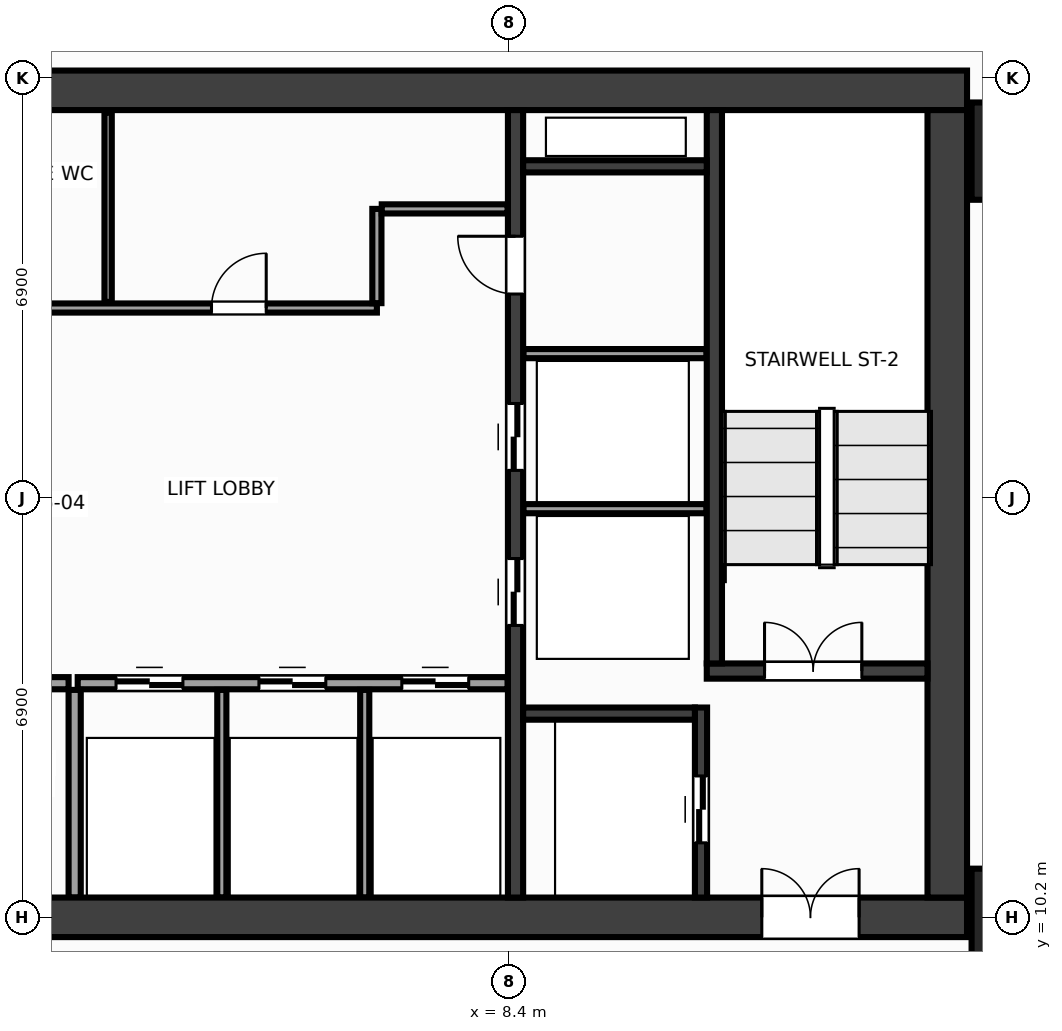
"""IFC4 building model, lengths in metres.
Left out: names, types, materials, properties, quantities, classifications, styles, units other than length and angle.
Written with IfcOpenShell. Run it as: python <this file> out.ifc"""

import sys

from ifc_helpers import new_model, si_unit, direction, frame, frame_2d, origin, origin_2d, place, context, subcontext, project, spatial, rectangle, extrude, source, transform, mapped, element, fill, save


model = new_model("IFC4")
c1 = context("Model", 3, precision=1e-05, world=origin(), true_north=direction((0.0, 1.0)))
c2 = subcontext(c1, "Body", "Model", "MODEL_VIEW")
j1 = project(units=[si_unit("LENGTHUNIT", "METRE"), si_unit("PLANEANGLEUNIT", "RADIAN")], contexts=[c1])
p1 = place(None, origin())
s1 = spatial("IfcSite", under=j1, at=p1, CompositionType="ELEMENT")
p2 = place(p1, origin())
s2 = spatial("IfcBuilding", under=s1, at=p2, CompositionType="ELEMENT")
p3 = place(p2, frame((0.0, 0.0, 77.6)))
s3 = spatial("IfcBuildingStorey", under=s2, at=p3, CompositionType="ELEMENT", Elevation=77.6)
m1 = source(origin(), c2, "Body", "SweptSolid", [
    extrude(rectangle(XDim=31.85, YDim=0.65, at=frame_2d((15.925, 0.0))), origin(), (0.0, 0.0, 1.0), 3.6),
])
p4 = place(p3, frame((-15.925, 23.8, 0.0), z_axis=(0.0, 0.0, 1.0), x_axis=(1.0, 0.0, 0.0)))
e1 = element("IfcWall", 1, at=p4, inside=s3, PredefinedType="SHEAR", context=c2, shape_type="MappedRepresentation", body=[
    mapped(m1, transform((0.0, 0.0, 0.0), x_axis=(1.0, 0.0, 0.0), y_axis=(0.0, 1.0, 0.0), z_axis=(0.0, 0.0, 1.0), scale=1.0)),
])
p5 = place(p3, frame((-15.925, 10.2, 0.0), z_axis=(0.0, 0.0, 1.0), x_axis=(1.0, 0.0, 0.0)))
e2 = element("IfcWall", 2, at=p5, inside=s3, PredefinedType="SHEAR", context=c2, shape_type="MappedRepresentation", body=[
    mapped(m1, transform((0.0, 0.0, 0.0), x_axis=(1.0, 0.0, 0.0), y_axis=(0.0, 1.0, 0.0), z_axis=(0.0, 0.0, 1.0), scale=1.0)),
])
p6 = place(p5, frame((1.775, 0.0, 0.0)))
e3 = element("IfcOpeningElement", 3, at=p6, cuts=e2, PredefinedType="OPENING", context=c2, shape_type="SweptSolid", body=[
    extrude(rectangle(XDim=1.6, YDim=2.15, at=frame_2d((0.8, 1.075))), frame((0.0, 0.337, 0.0), z_axis=(0.0, -1.0, 0.0), x_axis=(1.0, 0.0, 0.0)), (0.0, 0.0, 1.0), 0.674),
])
p7 = place(p5, frame((28.475, 0.0, 0.0)))
e4 = element("IfcOpeningElement", 4, at=p7, cuts=e2, PredefinedType="OPENING", context=c2, shape_type="SweptSolid", body=[
    extrude(rectangle(XDim=1.6, YDim=2.15, at=frame_2d((0.8, 1.075))), frame((0.0, 0.337, 0.0), z_axis=(0.0, -1.0, 0.0), x_axis=(1.0, 0.0, 0.0)), (0.0, 0.0, 1.0), 0.674),
])
p8 = place(p5, frame((15.175, 0.0, 0.0)))
e5 = element("IfcOpeningElement", 5, at=p8, cuts=e2, PredefinedType="OPENING", context=c2, shape_type="SweptSolid", body=[
    extrude(rectangle(XDim=1.5, YDim=2.2, at=frame_2d((0.75, 1.1))), frame((0.0, 0.337, 0.0), z_axis=(0.0, -1.0, 0.0), x_axis=(1.0, 0.0, 0.0)), (0.0, 0.0, 1.0), 0.674),
])
m2 = source(origin(), c2, "Body", "SweptSolid", [
    extrude(rectangle(XDim=12.95, YDim=0.65, at=frame_2d((6.475, 0.0))), origin(), (0.0, 0.0, 1.0), 3.6),
])
p9 = place(p3, frame((15.6, 10.525, 0.0), z_axis=(0.0, 0.0, 1.0), x_axis=(0.0, 1.0, 0.0)))
e6 = element("IfcWall", 6, at=p9, inside=s3, PredefinedType="SHEAR", context=c2, shape_type="MappedRepresentation", body=[
    mapped(m2, transform((0.0, 0.0, 0.0), x_axis=(1.0, 0.0, 0.0), y_axis=(0.0, 1.0, 0.0), z_axis=(0.0, 0.0, 1.0), scale=1.0)),
])
m3 = source(origin(), c2, "Body", "SweptSolid", [
    extrude(rectangle(XDim=12.95, YDim=0.25, at=frame_2d((6.475, 0.0))), origin(), (0.0, 0.0, 1.0), 3.6),
])
p10 = place(p3, frame((8.5, 10.525, 0.0), z_axis=(0.0, 0.0, 1.0), x_axis=(0.0, 1.0, 0.0)))
e7 = element("IfcWall", 7, at=p10, inside=s3, PredefinedType="SHEAR", context=c2, shape_type="MappedRepresentation", body=[
    mapped(m3, transform((0.0, 0.0, 0.0), x_axis=(1.0, 0.0, 0.0), y_axis=(0.0, 1.0, 0.0), z_axis=(0.0, 0.0, 1.0), scale=1.0)),
])
p11 = place(p10, frame((4.475, 0.0, 0.0)))
e8 = element("IfcOpeningElement", 8, at=p11, cuts=e7, PredefinedType="OPENING", context=c2, shape_type="SweptSolid", body=[
    extrude(rectangle(XDim=1.1, YDim=2.15, at=frame_2d((0.55, 1.075))), frame((0.0, 0.137, 0.0), z_axis=(0.0, -1.0, 0.0), x_axis=(1.0, 0.0, 0.0)), (0.0, 0.0, 1.0), 0.274),
])
p12 = place(p10, frame((7.025, 0.0, 0.0)))
e9 = element("IfcOpeningElement", 9, at=p12, cuts=e7, PredefinedType="OPENING", context=c2, shape_type="SweptSolid", body=[
    extrude(rectangle(XDim=1.1, YDim=2.15, at=frame_2d((0.55, 1.075))), frame((0.0, 0.137, 0.0), z_axis=(0.0, -1.0, 0.0), x_axis=(1.0, 0.0, 0.0)), (0.0, 0.0, 1.0), 0.274),
])
p13 = place(p10, frame((9.925, 0.0, 0.0)))
e10 = element("IfcOpeningElement", 10, at=p13, cuts=e7, PredefinedType="OPENING", context=c2, shape_type="SweptSolid", body=[
    extrude(rectangle(XDim=0.95, YDim=2.15, at=frame_2d((0.475, 1.075))), frame((0.0, 0.137, 0.0), z_axis=(0.0, -1.0, 0.0), x_axis=(1.0, 0.0, 0.0)), (0.0, 0.0, 1.0), 0.274),
])
m4 = source(origin(), c2, "Body", "SweptSolid", [
    extrude(rectangle(XDim=3.63, YDim=0.25, at=frame_2d((1.815, 0.0))), origin(), (0.0, 0.0, 1.0), 3.6),
])
p14 = place(p3, frame((11.645, 14.25, 0.0), z_axis=(0.0, 0.0, 1.0), x_axis=(1.0, 0.0, 0.0)))
e11 = element("IfcWall", 11, at=p14, inside=s3, PredefinedType="SHEAR", context=c2, shape_type="MappedRepresentation", body=[
    mapped(m4, transform((0.0, 0.0, 0.0), x_axis=(1.0, 0.0, 0.0), y_axis=(0.0, 1.0, 0.0), z_axis=(0.0, 0.0, 1.0), scale=1.0)),
])
p15 = place(p14, frame((0.95, 0.0, 0.0)))
e12 = element("IfcOpeningElement", 12, at=p15, cuts=e11, PredefinedType="OPENING", context=c2, shape_type="SweptSolid", body=[
    extrude(rectangle(XDim=1.6, YDim=2.15, at=frame_2d((0.8, 1.075))), frame((0.0, 0.137, 0.0), z_axis=(0.0, -1.0, 0.0), x_axis=(1.0, 0.0, 0.0)), (0.0, 0.0, 1.0), 0.274),
])
m5 = source(origin(), c2, "Body", "SweptSolid", [
    extrude(rectangle(XDim=9.1, YDim=0.25, at=frame_2d((4.55, 0.0))), origin(), (0.0, 0.0, 1.0), 3.6),
])
p16 = place(p3, frame((11.77, 14.375, 0.0), z_axis=(0.0, 0.0, 1.0), x_axis=(0.0, 1.0, 0.0)))
e13 = element("IfcWall", 13, at=p16, inside=s3, PredefinedType="SHEAR", context=c2, shape_type="MappedRepresentation", body=[
    mapped(m5, transform((0.0, 0.0, 0.0), x_axis=(1.0, 0.0, 0.0), y_axis=(0.0, 1.0, 0.0), z_axis=(0.0, 0.0, 1.0), scale=1.0)),
])
m6 = source(origin(), c2, "Body", "SweptSolid", [
    extrude(rectangle(XDim=3.125, YDim=0.2, at=frame_2d((1.562, 0.0))), origin(), (0.0, 0.0, 1.0), 3.6),
])
p17 = place(p3, frame((11.55, 10.525, 0.0), z_axis=(0.0, 0.0, 1.0), x_axis=(0.0, 1.0, 0.0)))
e14 = element("IfcWall", 14, at=p17, inside=s3, PredefinedType="SHEAR", context=c2, shape_type="MappedRepresentation", body=[
    mapped(m6, transform((0.0, 0.0, 0.0), x_axis=(1.0, 0.0, 0.0), y_axis=(0.0, 1.0, 0.0), z_axis=(0.0, 0.0, 1.0), scale=1.0)),
])
p18 = place(p17, frame((0.9, 0.0, 0.0)))
e15 = element("IfcOpeningElement", 15, at=p18, cuts=e14, PredefinedType="OPENING", context=c2, shape_type="SweptSolid", body=[
    extrude(rectangle(XDim=1.1, YDim=2.15, at=frame_2d((0.55, 1.075))), frame((0.0, 0.112, 0.0), z_axis=(0.0, -1.0, 0.0), x_axis=(1.0, 0.0, 0.0)), (0.0, 0.0, 1.0), 0.224),
])
m7 = source(origin(), c2, "Body", "SweptSolid", [
    extrude(rectangle(XDim=2.825, YDim=0.2, at=frame_2d((1.413, 0.0))), origin(), (0.0, 0.0, 1.0), 3.6),
])
p19 = place(p3, frame((8.625, 13.55, 0.0), z_axis=(0.0, 0.0, 1.0), x_axis=(1.0, 0.0, 0.0)))
e16 = element("IfcWall", 16, at=p19, inside=s3, PredefinedType="SHEAR", context=c2, shape_type="MappedRepresentation", body=[
    mapped(m7, transform((0.0, 0.0, 0.0), x_axis=(1.0, 0.0, 0.0), y_axis=(0.0, 1.0, 0.0), z_axis=(0.0, 0.0, 1.0), scale=1.0)),
])
m8 = source(origin(), c2, "Body", "SweptSolid", [
    extrude(rectangle(XDim=3.02, YDim=0.2, at=frame_2d((1.51, 0.0))), origin(), (0.0, 0.0, 1.0), 3.6),
])
p20 = place(p3, frame((8.625, 22.55, 0.0), z_axis=(0.0, 0.0, 1.0), x_axis=(1.0, 0.0, 0.0)))
e17 = element("IfcWall", 17, at=p20, inside=s3, PredefinedType="SHEAR", context=c2, shape_type="MappedRepresentation", body=[
    mapped(m8, transform((0.0, 0.0, 0.0), x_axis=(1.0, 0.0, 0.0), y_axis=(0.0, 1.0, 0.0), z_axis=(0.0, 0.0, 1.0), scale=1.0)),
])
m9 = source(origin(), c2, "Body", "SweptSolid", [
    extrude(rectangle(XDim=1.6, YDim=1.6, at=origin_2d()), origin(), (0.0, 0.0, 1.0), 3.6),
])
for number, where, z_axis, x_axis in (
    (18, (16.8, 10.2, 0.0), (0.0, 0.0, 1.0), (1.0, 0.0, 0.0)),
    (19, (16.8, 22.8, 0.0), (0.0, 0.0, 1.0), (1.0, 0.0, 0.0)),
):
    element("IfcColumn", number, at=place(p3, frame(where, z_axis=z_axis, x_axis=x_axis)), inside=s3, PredefinedType="COLUMN", context=c2, shape_type="MappedRepresentation", body=[
        mapped(m9, transform((0.0, 0.0, 0.0), x_axis=(1.0, 0.0, 0.0), y_axis=(0.0, 1.0, 0.0), z_axis=(0.0, 0.0, 1.0), scale=1.0)),
    ])
m10 = source(origin(), c2, "Body", "SweptSolid", [
    extrude(rectangle(XDim=3.01, YDim=0.15, at=frame_2d((1.505, 0.0))), origin(), (0.0, 0.0, 1.0), 3.36),
])
for number, where, z_axis, x_axis in (
    (20, (8.63, 16.92, 0.0), (0.0, 0.0, 1.0), (1.0, 0.0, 0.0)),
    (21, (8.63, 19.47, 0.0), (0.0, 0.0, 1.0), (1.0, 0.0, 0.0)),
):
    element("IfcWall", number, at=place(p3, frame(where, z_axis=z_axis, x_axis=x_axis)), inside=s3, PredefinedType="PARTITIONING", context=c2, shape_type="MappedRepresentation", body=[
        mapped(m10, transform((0.0, 0.0, 0.0), x_axis=(1.0, 0.0, 0.0), y_axis=(0.0, 1.0, 0.0), z_axis=(0.0, 0.0, 1.0), scale=1.0)),
    ])
m11 = source(origin(), c2, "Body", "SweptSolid", [
    extrude(rectangle(XDim=7.07, YDim=0.2, at=frame_2d((3.535, 0.0))), origin(), (0.0, 0.0, 1.0), 3.36),
])
p21 = place(p3, frame((1.3, 14.05, 0.0), z_axis=(0.0, 0.0, 1.0), x_axis=(1.0, 0.0, 0.0)))
e22 = element("IfcWall", 22, at=p21, inside=s3, PredefinedType="PARTITIONING", context=c2, shape_type="MappedRepresentation", body=[
    mapped(m11, transform((0.0, 0.0, 0.0), x_axis=(1.0, 0.0, 0.0), y_axis=(0.0, 1.0, 0.0), z_axis=(0.0, 0.0, 1.0), scale=1.0)),
])
p22 = place(p21, frame((0.63, 0.0, 0.0)))
e23 = element("IfcOpeningElement", 23, at=p22, cuts=e22, PredefinedType="OPENING", context=c2, shape_type="SweptSolid", body=[
    extrude(rectangle(XDim=1.1, YDim=2.15, at=frame_2d((0.55, 1.075))), frame((0.0, 0.112, 0.0), z_axis=(0.0, -1.0, 0.0), x_axis=(1.0, 0.0, 0.0)), (0.0, 0.0, 1.0), 0.224),
])
p23 = place(p21, frame((2.98, 0.0, 0.0)))
e24 = element("IfcOpeningElement", 24, at=p23, cuts=e22, PredefinedType="OPENING", context=c2, shape_type="SweptSolid", body=[
    extrude(rectangle(XDim=1.1, YDim=2.15, at=frame_2d((0.55, 1.075))), frame((0.0, 0.112, 0.0), z_axis=(0.0, -1.0, 0.0), x_axis=(1.0, 0.0, 0.0)), (0.0, 0.0, 1.0), 0.224),
])
p24 = place(p21, frame((5.33, 0.0, 0.0)))
e25 = element("IfcOpeningElement", 25, at=p24, cuts=e22, PredefinedType="OPENING", context=c2, shape_type="SweptSolid", body=[
    extrude(rectangle(XDim=1.1, YDim=2.15, at=frame_2d((0.55, 1.075))), frame((0.0, 0.112, 0.0), z_axis=(0.0, -1.0, 0.0), x_axis=(1.0, 0.0, 0.0)), (0.0, 0.0, 1.0), 0.224),
])
m12 = source(origin(), c2, "Body", "SweptSolid", [
    extrude(rectangle(XDim=3.415, YDim=0.2, at=frame_2d((1.708, 0.0))), origin(), (0.0, 0.0, 1.0), 3.36),
])
p25 = place(p3, frame((1.25, 10.525, 0.0), z_axis=(0.0, 0.0, 1.0), x_axis=(0.0, 1.0, 0.0)))
e26 = element("IfcWall", 26, at=p25, inside=s3, PredefinedType="PARTITIONING", context=c2, shape_type="MappedRepresentation", body=[
    mapped(m12, transform((0.0, 0.0, 0.0), x_axis=(1.0, 0.0, 0.0), y_axis=(0.0, 1.0, 0.0), z_axis=(0.0, 0.0, 1.0), scale=1.0)),
])
m13 = source(origin(), c2, "Body", "SweptSolid", [
    extrude(rectangle(XDim=2.3, YDim=0.2, at=frame_2d((1.15, 0.0))), origin(), (0.0, 0.0, 1.0), 3.36),
])
p26 = place(p3, frame((-1.15, 14.05, 0.0), z_axis=(0.0, 0.0, 1.0), x_axis=(1.0, 0.0, 0.0)))
e27 = element("IfcWall", 27, at=p26, inside=s3, PredefinedType="PARTITIONING", context=c2, shape_type="MappedRepresentation", body=[
    mapped(m13, transform((0.0, 0.0, 0.0), x_axis=(1.0, 0.0, 0.0), y_axis=(0.0, 1.0, 0.0), z_axis=(0.0, 0.0, 1.0), scale=1.0)),
])
p27 = place(p26, frame((0.4, 0.0, 0.0)))
e28 = element("IfcOpeningElement", 28, at=p27, cuts=e27, PredefinedType="OPENING", context=c2, shape_type="SweptSolid", body=[
    extrude(rectangle(XDim=1.5, YDim=2.2, at=frame_2d((0.75, 1.1))), frame((0.0, 0.112, 0.0), z_axis=(0.0, -1.0, 0.0), x_axis=(1.0, 0.0, 0.0)), (0.0, 0.0, 1.0), 0.224),
])
m14 = source(origin(), c2, "Body", "SweptSolid", [
    extrude(rectangle(XDim=14.59, YDim=0.15, at=frame_2d((7.295, 0.0))), origin(), (0.0, 0.0, 1.0), 3.36),
])
p28 = place(p3, frame((-8.37, 20.22, 0.0), z_axis=(0.0, 0.0, 1.0), x_axis=(1.0, 0.0, 0.0)))
e29 = element("IfcWall", 29, at=p28, inside=s3, PredefinedType="PARTITIONING", context=c2, shape_type="MappedRepresentation", body=[
    mapped(m14, transform((0.0, 0.0, 0.0), x_axis=(1.0, 0.0, 0.0), y_axis=(0.0, 1.0, 0.0), z_axis=(0.0, 0.0, 1.0), scale=1.0)),
])
p29 = place(p28, frame((1.06, 0.0, 0.0)))
e30 = element("IfcOpeningElement", 30, at=p29, cuts=e29, PredefinedType="OPENING", context=c2, shape_type="SweptSolid", body=[
    extrude(rectangle(XDim=0.9, YDim=2.15, at=frame_2d((0.45, 1.075))), frame((0.0, 0.087, 0.0), z_axis=(0.0, -1.0, 0.0), x_axis=(1.0, 0.0, 0.0)), (0.0, 0.0, 1.0), 0.174),
])
p30 = place(p28, frame((4.22, 0.0, 0.0)))
e31 = element("IfcOpeningElement", 31, at=p30, cuts=e29, PredefinedType="OPENING", context=c2, shape_type="SweptSolid", body=[
    extrude(rectangle(XDim=0.9, YDim=2.15, at=frame_2d((0.45, 1.075))), frame((0.0, 0.087, 0.0), z_axis=(0.0, -1.0, 0.0), x_axis=(1.0, 0.0, 0.0)), (0.0, 0.0, 1.0), 0.174),
])
p31 = place(p28, frame((7.82, 0.0, 0.0)))
e32 = element("IfcOpeningElement", 32, at=p31, cuts=e29, PredefinedType="OPENING", context=c2, shape_type="SweptSolid", body=[
    extrude(rectangle(XDim=0.9, YDim=2.15, at=frame_2d((0.45, 1.075))), frame((0.0, 0.087, 0.0), z_axis=(0.0, -1.0, 0.0), x_axis=(1.0, 0.0, 0.0)), (0.0, 0.0, 1.0), 0.174),
])
p32 = place(p28, frame((11.87, 0.0, 0.0)))
e33 = element("IfcOpeningElement", 33, at=p32, cuts=e29, PredefinedType="OPENING", context=c2, shape_type="SweptSolid", body=[
    extrude(rectangle(XDim=0.9, YDim=2.15, at=frame_2d((0.45, 1.075))), frame((0.0, 0.087, 0.0), z_axis=(0.0, -1.0, 0.0), x_axis=(1.0, 0.0, 0.0)), (0.0, 0.0, 1.0), 0.174),
])
m15 = source(origin(), c2, "Body", "SweptSolid", [
    extrude(rectangle(XDim=1.55, YDim=0.15, at=frame_2d((0.775, 0.0))), origin(), (0.0, 0.0, 1.0), 3.36),
])
p33 = place(p3, frame((6.22, 20.3, 0.0), z_axis=(0.0, 0.0, 1.0), x_axis=(0.0, 1.0, 0.0)))
e34 = element("IfcWall", 34, at=p33, inside=s3, PredefinedType="PARTITIONING", context=c2, shape_type="MappedRepresentation", body=[
    mapped(m15, transform((0.0, 0.0, 0.0), x_axis=(1.0, 0.0, 0.0), y_axis=(0.0, 1.0, 0.0), z_axis=(0.0, 0.0, 1.0), scale=1.0)),
])
m16 = source(origin(), c2, "Body", "SweptSolid", [
    extrude(rectangle(XDim=2.07, YDim=0.15, at=frame_2d((1.035, 0.0))), origin(), (0.0, 0.0, 1.0), 3.36),
])
p34 = place(p3, frame((6.3, 21.85, 0.0), z_axis=(0.0, 0.0, 1.0), x_axis=(1.0, 0.0, 0.0)))
e35 = element("IfcWall", 35, at=p34, inside=s3, PredefinedType="PARTITIONING", context=c2, shape_type="MappedRepresentation", body=[
    mapped(m16, transform((0.0, 0.0, 0.0), x_axis=(1.0, 0.0, 0.0), y_axis=(0.0, 1.0, 0.0), z_axis=(0.0, 0.0, 1.0), scale=1.0)),
])
m17 = source(origin(), c2, "Body", "SweptSolid", [
    extrude(rectangle(XDim=3.415, YDim=0.15, at=frame_2d((1.708, 0.0))), origin(), (0.0, 0.0, 1.0), 3.36),
])
for number, where, z_axis, x_axis in (
    (36, (3.67, 10.525, 0.0), (0.0, 0.0, 1.0), (0.0, 1.0, 0.0)),
    (37, (6.02, 10.525, 0.0), (0.0, 0.0, 1.0), (0.0, 1.0, 0.0)),
):
    element("IfcWall", number, at=place(p3, frame(where, z_axis=z_axis, x_axis=x_axis)), inside=s3, PredefinedType="PARTITIONING", context=c2, shape_type="MappedRepresentation", body=[
        mapped(m17, transform((0.0, 0.0, 0.0), x_axis=(1.0, 0.0, 0.0), y_axis=(0.0, 1.0, 0.0), z_axis=(0.0, 0.0, 1.0), scale=1.0)),
    ])
m18 = source(origin(), c2, "Body", "SweptSolid", [
    extrude(rectangle(XDim=3.115, YDim=0.12, at=frame_2d((1.558, 0.0))), origin(), (0.0, 0.0, 1.0), 3.36),
])
p35 = place(p3, frame((1.8, 20.32, 0.0), z_axis=(0.0, 0.0, 1.0), x_axis=(0.0, 1.0, 0.0)))
e38 = element("IfcWall", 38, at=p35, inside=s3, PredefinedType="PARTITIONING", context=c2, shape_type="MappedRepresentation", body=[
    mapped(m18, transform((0.0, 0.0, 0.0), x_axis=(1.0, 0.0, 0.0), y_axis=(0.0, 1.0, 0.0), z_axis=(0.0, 0.0, 1.0), scale=1.0)),
])
m19 = source(origin(), c2, "Body", "SweptSolid", [
    extrude(rectangle(XDim=1.6, YDim=2.15, at=frame_2d((0.8, 1.075))), frame((0.0, 0.025, 0.0), z_axis=(0.0, -1.0, 0.0), x_axis=(1.0, 0.0, 0.0)), (0.0, 0.0, 1.0), 0.05),
])
p36 = place(p15, origin())
e39 = element("IfcDoor", 39, at=p36, inside=s3, OperationType="DOUBLE_DOOR_SINGLE_SWING", PredefinedType="DOOR", context=c2, shape_type="MappedRepresentation", body=[
    mapped(m19, transform((0.0, 0.0, 0.0), x_axis=(1.0, 0.0, 0.0), y_axis=(0.0, 1.0, 0.0), z_axis=(0.0, 0.0, 1.0), scale=1.0)),
])
fill(e12, e39)
p37 = place(p7, origin())
e40 = element("IfcDoor", 40, at=p37, inside=s3, OperationType="DOUBLE_DOOR_SINGLE_SWING", PredefinedType="DOOR", context=c2, shape_type="MappedRepresentation", body=[
    mapped(m19, transform((0.0, 0.0, 0.0), x_axis=(1.0, 0.0, 0.0), y_axis=(0.0, 1.0, 0.0), z_axis=(0.0, 0.0, 1.0), scale=1.0)),
])
fill(e4, e40)
m20 = source(origin(), c2, "Body", "SweptSolid", [
    extrude(rectangle(XDim=1.1, YDim=2.15, at=frame_2d((0.55, 1.075))), frame((0.0, 0.025, 0.0), z_axis=(0.0, -1.0, 0.0), x_axis=(1.0, 0.0, 0.0)), (0.0, 0.0, 1.0), 0.05),
])
p38 = place(p18, origin())
e41 = element("IfcDoor", 41, at=p38, inside=s3, OperationType="DOUBLE_DOOR_SLIDING", PredefinedType="DOOR", context=c2, shape_type="MappedRepresentation", body=[
    mapped(m20, transform((0.0, 0.0, 0.0), x_axis=(1.0, 0.0, 0.0), y_axis=(0.0, 1.0, 0.0), z_axis=(0.0, 0.0, 1.0), scale=1.0)),
])
fill(e15, e41)
p39 = place(p11, origin())
e42 = element("IfcDoor", 42, at=p39, inside=s3, OperationType="DOUBLE_DOOR_SLIDING", PredefinedType="DOOR", context=c2, shape_type="MappedRepresentation", body=[
    mapped(m20, transform((0.0, 0.0, 0.0), x_axis=(1.0, 0.0, 0.0), y_axis=(0.0, 1.0, 0.0), z_axis=(0.0, 0.0, 1.0), scale=1.0)),
])
fill(e8, e42)
p40 = place(p12, origin())
e43 = element("IfcDoor", 43, at=p40, inside=s3, OperationType="DOUBLE_DOOR_SLIDING", PredefinedType="DOOR", context=c2, shape_type="MappedRepresentation", body=[
    mapped(m20, transform((0.0, 0.0, 0.0), x_axis=(1.0, 0.0, 0.0), y_axis=(0.0, 1.0, 0.0), z_axis=(0.0, 0.0, 1.0), scale=1.0)),
])
fill(e9, e43)
m21 = source(origin(), c2, "Body", "SweptSolid", [
    extrude(rectangle(XDim=0.95, YDim=2.15, at=frame_2d((0.475, 1.075))), frame((0.0, 0.025, 0.0), z_axis=(0.0, -1.0, 0.0), x_axis=(1.0, 0.0, 0.0)), (0.0, 0.0, 1.0), 0.05),
])
p41 = place(p13, origin())
e44 = element("IfcDoor", 44, at=p41, inside=s3, OperationType="SINGLE_SWING_RIGHT", PredefinedType="DOOR", context=c2, shape_type="MappedRepresentation", body=[
    mapped(m21, transform((0.0, 0.0, 0.0), x_axis=(1.0, 0.0, 0.0), y_axis=(0.0, 1.0, 0.0), z_axis=(0.0, 0.0, 1.0), scale=1.0)),
])
fill(e10, e44)
p42 = place(p22, origin())
e45 = element("IfcDoor", 45, at=p42, inside=s3, OperationType="DOUBLE_DOOR_SLIDING", PredefinedType="DOOR", context=c2, shape_type="MappedRepresentation", body=[
    mapped(m20, transform((0.0, 0.0, 0.0), x_axis=(1.0, 0.0, 0.0), y_axis=(0.0, 1.0, 0.0), z_axis=(0.0, 0.0, 1.0), scale=1.0)),
])
fill(e23, e45)
p43 = place(p23, origin())
e46 = element("IfcDoor", 46, at=p43, inside=s3, OperationType="DOUBLE_DOOR_SLIDING", PredefinedType="DOOR", context=c2, shape_type="MappedRepresentation", body=[
    mapped(m20, transform((0.0, 0.0, 0.0), x_axis=(1.0, 0.0, 0.0), y_axis=(0.0, 1.0, 0.0), z_axis=(0.0, 0.0, 1.0), scale=1.0)),
])
fill(e24, e46)
p44 = place(p24, origin())
e47 = element("IfcDoor", 47, at=p44, inside=s3, OperationType="DOUBLE_DOOR_SLIDING", PredefinedType="DOOR", context=c2, shape_type="MappedRepresentation", body=[
    mapped(m20, transform((0.0, 0.0, 0.0), x_axis=(1.0, 0.0, 0.0), y_axis=(0.0, 1.0, 0.0), z_axis=(0.0, 0.0, 1.0), scale=1.0)),
])
fill(e25, e47)
m22 = source(origin(), c2, "Body", "SweptSolid", [
    extrude(rectangle(XDim=0.9, YDim=2.15, at=frame_2d((0.45, 1.075))), frame((0.0, 0.025, 0.0), z_axis=(0.0, -1.0, 0.0), x_axis=(1.0, 0.0, 0.0)), (0.0, 0.0, 1.0), 0.05),
])
p45 = place(p32, origin())
e48 = element("IfcDoor", 48, at=p45, inside=s3, OperationType="SINGLE_SWING_RIGHT", PredefinedType="DOOR", context=c2, shape_type="MappedRepresentation", body=[
    mapped(m22, transform((0.0, 0.0, 0.0), x_axis=(1.0, 0.0, 0.0), y_axis=(0.0, 1.0, 0.0), z_axis=(0.0, 0.0, 1.0), scale=1.0)),
])
fill(e33, e48)
save(model, sys.argv[1])
